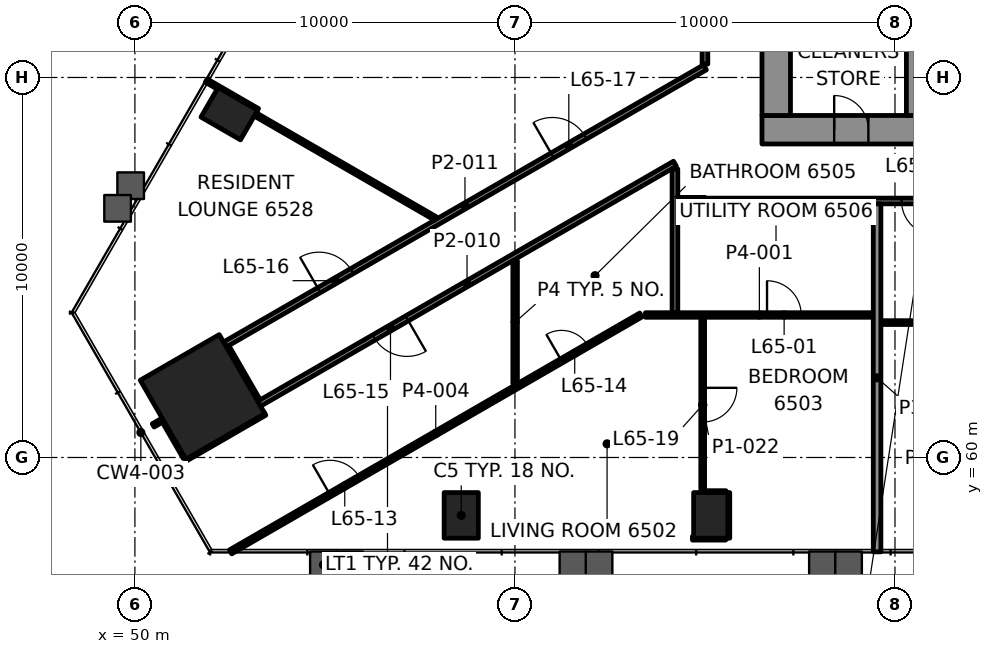
"""IFC4 building model, lengths in metres.
Left out: names, types, materials, properties, quantities, classifications, styles, units other than length and angle.
Written with IfcOpenShell. Run it as: python <this file> out.ifc"""

import sys

from ifc_helpers import new_model, si_unit, direction, frame, frame_2d, origin, origin_2d, place, context, subcontext, project, spatial, rectangle, hollow_rectangle, extrude, element, fill, save


model = new_model("IFC4")
c1 = context("Model", 3, precision=1e-05, world=origin(), true_north=direction((0.0, 1.0)))
c2 = subcontext(c1, "Body", "Model", "MODEL_VIEW")
j1 = project(units=[si_unit("LENGTHUNIT", "METRE"), si_unit("PLANEANGLEUNIT", "RADIAN")], contexts=[c1])
p1 = place(None, origin())
s1 = spatial("IfcSite", under=j1, at=p1, CompositionType="ELEMENT")
p2 = place(p1, origin())
s2 = spatial("IfcBuilding", under=s1, at=p2, CompositionType="ELEMENT")
p3 = place(p2, frame((0.0, 0.0, 274.1)))
s3 = spatial("IfcBuildingStorey", under=s2, at=p3, CompositionType="ELEMENT", Elevation=274.1)
p4 = place(p3, frame((51.78, 61.594, 0.0), z_axis=(0.0, 0.0, 1.0), x_axis=(0.5, -0.866025403784, 0.0)))
e1 = element("IfcColumn", 1, at=p4, inside=s3, PredefinedType="COLUMN", context=c2, shape_type="SweptSolid", body=[
    extrude(rectangle(XDim=2.4, YDim=2.4, at=origin_2d()), origin(), (0.0, 0.0, 1.0), 3.5),
])
for number, where, z_axis, x_axis in (
    (2, (58.587, 58.476, -0.0), (0.0, 0.0, 1.0), (1.0, 0.0, 0.0)),
    (3, (65.152, 58.476, -0.0), (0.0, 0.0, 1.0), (1.0, 0.0, 0.0)),
    (4, (52.483, 69.047, -0.0), (0.0, 0.0, 1.0), (-0.5, -0.866, 0.0)),
):
    element("IfcColumn", number, at=place(p3, frame(where, z_axis=z_axis, x_axis=x_axis)), inside=s3, PredefinedType="COLUMN", context=c2, shape_type="SweptSolid", body=[
        extrude(hollow_rectangle(XDim=0.9, YDim=1.2, WallThickness=0.06, at=origin_2d()), origin(), (0.0, 0.0, 1.0), 3.5),
    ])
p5 = place(p3, frame((66.5, 68.625, 0.0), z_axis=(0.0, 0.0, 1.0), x_axis=(1.0, 0.0, 0.0)))
e5 = element("IfcWall", 5, at=p5, inside=s3, PredefinedType="SHEAR", context=c2, shape_type="SweptSolid", body=[
    extrude(rectangle(XDim=17.0, YDim=0.75, at=frame_2d((8.5, 0.0))), origin(), (0.0, 0.0, 1.0), 3.3),
])
p6 = place(p5, frame((1.9, 0.0, 0.0)))
e6 = element("IfcOpeningElement", 6, at=p6, cuts=e5, PredefinedType="OPENING", context=c2, shape_type="SweptSolid", body=[
    extrude(rectangle(XDim=0.9, YDim=2.1, at=frame_2d((0.45, 1.05))), frame((0.0, 0.385, 0.0), z_axis=(0.0, -1.0, 0.0), x_axis=(1.0, 0.0, 0.0)), (0.0, 0.0, 1.0), 0.77),
])
p7 = place(p3, frame((66.875, 69.0, 0.0), z_axis=(0.0, 0.0, 1.0), x_axis=(0.0, 1.0, 0.0)))
e7 = element("IfcWall", 7, at=p7, inside=s3, PredefinedType="SHEAR", context=c2, shape_type="SweptSolid", body=[
    extrude(rectangle(XDim=12.0, YDim=0.75, at=frame_2d((6.0, 0.0))), origin(), (0.0, 0.0, 1.0), 3.3),
])
p8 = place(p7, frame((3.7, 0.0, 0.0)))
e8 = element("IfcOpeningElement", 8, at=p8, cuts=e7, PredefinedType="OPENING", context=c2, shape_type="SweptSolid", body=[
    extrude(rectangle(XDim=1.2, YDim=2.1, at=frame_2d((0.6, 1.05))), frame((0.0, 0.385, 0.0), z_axis=(0.0, -1.0, 0.0), x_axis=(1.0, 0.0, 0.0)), (0.0, 0.0, 1.0), 0.77),
])
p9 = place(p3, frame((70.45, 69.0, 0.0), z_axis=(0.0, 0.0, 1.0), x_axis=(0.0, 1.0, 0.0)))
e9 = element("IfcWall", 9, at=p9, inside=s3, PredefinedType="SHEAR", context=c2, shape_type="SweptSolid", body=[
    extrude(rectangle(XDim=2.6, YDim=0.3, at=frame_2d((1.3, 0.0))), origin(), (0.0, 0.0, 1.0), 3.3),
])
p10 = place(p3, frame((64.67, 57.876, 0.0), z_axis=(0.0, 0.0, 1.0), x_axis=(1.0, 0.0, 0.0)))
e10 = element("IfcWall", 10, at=p10, inside=s3, PredefinedType="PARTITIONING", context=c2, shape_type="SweptSolid", body=[
    extrude(rectangle(XDim=0.875, YDim=0.1, at=frame_2d((0.438, 0.0))), origin(), (0.0, 0.0, 1.0), 2.7),
])
p11 = place(p3, frame((64.99, 59.076, 0.0), z_axis=(0.0, 0.0, 1.0), x_axis=(1.0, 0.0, 0.0)))
e11 = element("IfcWall", 11, at=p11, inside=s3, PredefinedType="PARTITIONING", context=c2, shape_type="SweptSolid", body=[
    extrude(rectangle(XDim=0.562, YDim=0.1, at=frame_2d((0.281, 0.0))), origin(), (0.0, 0.0, 1.0), 2.7),
])
p12 = place(p3, frame((69.629, 63.55, 0.0), z_axis=(0.0, 0.0, 1.0), x_axis=(1.0, 0.0, 0.0)))
e12 = element("IfcWall", 12, at=p12, inside=s3, PredefinedType="PARTITIONING", context=c2, shape_type="SweptSolid", body=[
    extrude(rectangle(XDim=8.653, YDim=0.1, at=frame_2d((4.326, 0.0))), origin(), (0.0, 0.0, 1.0), 2.7),
])
p13 = place(p3, frame((63.434, 63.75, 0.0), z_axis=(0.0, 0.0, 1.0), x_axis=(1.0, 0.0, 0.0)))
e13 = element("IfcWall", 13, at=p13, inside=s3, PredefinedType="PARTITIONING", context=c2, shape_type="SweptSolid", body=[
    extrude(rectangle(XDim=5.995, YDim=0.12, at=frame_2d((2.997, 0.0))), origin(), (0.0, 0.0, 1.0), 2.7),
])
p14 = place(p13, frame((3.199, 0.0, 0.0)))
e14 = element("IfcOpeningElement", 14, at=p14, cuts=e13, PredefinedType="OPENING", context=c2, shape_type="SweptSolid", body=[
    extrude(rectangle(XDim=0.9, YDim=2.1, at=frame_2d((0.45, 1.05))), frame((0.0, 0.07, 0.0), z_axis=(0.0, -1.0, 0.0), x_axis=(1.0, 0.0, 0.0)), (0.0, 0.0, 1.0), 0.14),
])
p15 = place(p3, frame((85.0, 66.75, 0.0), z_axis=(0.0, 0.0, 1.0), x_axis=(-1.0, 0.0, 0.0)))
e15 = element("IfcWall", 15, at=p15, inside=s3, PredefinedType="PARTITIONING", context=c2, shape_type="SweptSolid", body=[
    extrude(rectangle(XDim=19.999, YDim=0.15, at=frame_2d((10.0, 0.0))), origin(), (0.0, 0.0, 1.0), 2.7),
])
p16 = place(p15, frame((2.96, 0.0, 0.0)))
e16 = element("IfcOpeningElement", 16, at=p16, cuts=e15, PredefinedType="OPENING", context=c2, shape_type="SweptSolid", body=[
    extrude(rectangle(XDim=1.0, YDim=2.1, at=frame_2d((0.5, 1.05))), frame((0.0, 0.085, 0.0), z_axis=(0.0, -1.0, 0.0), x_axis=(1.0, 0.0, 0.0)), (0.0, 0.0, 1.0), 0.17),
])
p17 = place(p15, frame((7.361, 0.0, 0.0)))
e17 = element("IfcOpeningElement", 17, at=p17, cuts=e15, PredefinedType="OPENING", context=c2, shape_type="SweptSolid", body=[
    extrude(rectangle(XDim=0.9, YDim=2.1, at=frame_2d((0.45, 1.05))), frame((0.0, 0.085, 0.0), z_axis=(0.0, -1.0, 0.0), x_axis=(1.0, 0.0, 0.0)), (0.0, 0.0, 1.0), 0.17),
])
p18 = place(p15, frame((9.55, 0.0, 0.0)))
e18 = element("IfcOpeningElement", 18, at=p18, cuts=e15, PredefinedType="OPENING", context=c2, shape_type="SweptSolid", body=[
    extrude(rectangle(XDim=0.9, YDim=2.1, at=frame_2d((0.45, 1.05))), frame((0.0, 0.085, 0.0), z_axis=(0.0, -1.0, 0.0), x_axis=(1.0, 0.0, 0.0)), (0.0, 0.0, 1.0), 0.17),
])
p19 = place(p15, frame((11.738, 0.0, 0.0)))
e19 = element("IfcOpeningElement", 19, at=p19, cuts=e15, PredefinedType="OPENING", context=c2, shape_type="SweptSolid", body=[
    extrude(rectangle(XDim=0.9, YDim=2.1, at=frame_2d((0.45, 1.05))), frame((0.0, 0.085, 0.0), z_axis=(0.0, -1.0, 0.0), x_axis=(1.0, 0.0, 0.0)), (0.0, 0.0, 1.0), 0.17),
])
p20 = place(p15, frame((13.926, 0.0, 0.0)))
e20 = element("IfcOpeningElement", 20, at=p20, cuts=e15, PredefinedType="OPENING", context=c2, shape_type="SweptSolid", body=[
    extrude(rectangle(XDim=0.9, YDim=2.1, at=frame_2d((0.45, 1.05))), frame((0.0, 0.085, 0.0), z_axis=(0.0, -1.0, 0.0), x_axis=(1.0, 0.0, 0.0)), (0.0, 0.0, 1.0), 0.17),
])
p21 = place(p3, frame((64.295, 66.769, 0.0), z_axis=(0.0, 0.0, 1.0), x_axis=(1.0, 0.0, 0.0)))
e21 = element("IfcWall", 21, at=p21, inside=s3, PredefinedType="PARTITIONING", context=c2, shape_type="SweptSolid", body=[
    extrude(rectangle(XDim=0.705, YDim=0.15, at=frame_2d((0.353, 0.0))), origin(), (0.0, 0.0, 1.0), 2.7),
])
p22 = place(p3, frame((52.517, 57.516, 0.0), z_axis=(0.0, 0.0, 1.0), x_axis=(0.866028080334, 0.499995364051, 0.0)))
e22 = element("IfcWall", 22, at=p22, inside=s3, PredefinedType="PARTITIONING", context=c2, shape_type="SweptSolid", body=[
    extrude(rectangle(XDim=12.467, YDim=0.12, at=frame_2d((6.234, 0.0))), origin(), (0.0, 0.0, 1.0), 2.7),
])
p23 = place(p22, frame((3.019, 0.0, 0.0)))
e23 = element("IfcOpeningElement", 23, at=p23, cuts=e22, PredefinedType="OPENING", context=c2, shape_type="SweptSolid", body=[
    extrude(rectangle(XDim=0.9, YDim=2.1, at=frame_2d((0.45, 1.05))), frame((0.0, 0.07, 0.0), z_axis=(0.0, -1.0, 0.0), x_axis=(1.0, 0.0, 0.0)), (0.0, 0.0, 1.0), 0.14),
])
p24 = place(p22, frame((10.057, 0.0, 0.0)))
e24 = element("IfcOpeningElement", 24, at=p24, cuts=e22, PredefinedType="OPENING", context=c2, shape_type="SweptSolid", body=[
    extrude(rectangle(XDim=0.8, YDim=2.1, at=frame_2d((0.4, 1.05))), frame((0.0, 0.07, 0.0), z_axis=(0.0, -1.0, 0.0), x_axis=(1.0, 0.0, 0.0)), (0.0, 0.0, 1.0), 0.14),
])
p25 = place(p3, frame((51.341, 59.955, 0.0), z_axis=(0.0, 0.0, 1.0), x_axis=(0.866036455013, 0.499980858223, 0.0)))
e25 = element("IfcWall", 25, at=p25, inside=s3, PredefinedType="PARTITIONING", context=c2, shape_type="SweptSolid", body=[
    extrude(rectangle(XDim=2.399, YDim=0.1, at=frame_2d((1.199, 0.0))), origin(), (0.0, 0.0, 1.0), 2.7),
])
p26 = place(p3, frame((64.21, 67.731, 0.0), z_axis=(0.0, 0.0, 1.0), x_axis=(-0.866027247007, -0.499996807431, 0.0)))
e26 = element("IfcWall", 26, at=p26, inside=s3, PredefinedType="PARTITIONING", context=c2, shape_type="SweptSolid", body=[
    extrude(rectangle(XDim=12.633, YDim=0.15, at=frame_2d((6.316, 0.0))), origin(), (0.0, 0.0, 1.0), 2.547),
])
p27 = place(p26, frame((8.143, 0.0, 0.0)))
e27 = element("IfcOpeningElement", 27, at=p27, cuts=e26, PredefinedType="OPENING", context=c2, shape_type="SweptSolid", body=[
    extrude(rectangle(XDim=1.0, YDim=2.1, at=frame_2d((0.5, 1.05))), frame((0.0, 0.085, 0.0), z_axis=(0.0, -1.0, 0.0), x_axis=(1.0, 0.0, 0.0)), (0.0, 0.0, 1.0), 0.17),
])
p28 = place(p3, frame((50.481, 60.844, 0.0), z_axis=(0.0, 0.0, 1.0), x_axis=(0.866429964967, 0.499298623879, 0.0)))
e28 = element("IfcWall", 28, at=p28, inside=s3, PredefinedType="PARTITIONING", context=c2, shape_type="SweptSolid", body=[
    extrude(rectangle(XDim=0.249, YDim=0.1, at=frame_2d((0.125, 0.0))), origin(), (0.0, 0.0, 1.0), 2.7),
])
p29 = place(p3, frame((52.37, 62.974, 0.0), z_axis=(0.0, 0.0, 1.0), x_axis=(0.866025849409, 0.499999228155, 0.0)))
e29 = element("IfcWall", 29, at=p29, inside=s3, PredefinedType="PARTITIONING", context=c2, shape_type="SweptSolid", body=[
    extrude(rectangle(XDim=14.584, YDim=0.15, at=frame_2d((7.292, 0.0))), origin(), (0.0, 0.0, 1.0), 2.7),
])
p30 = place(p29, frame((2.858, 0.0, 0.0)))
e30 = element("IfcOpeningElement", 30, at=p30, cuts=e29, PredefinedType="OPENING", context=c2, shape_type="SweptSolid", body=[
    extrude(rectangle(XDim=1.0, YDim=2.1, at=frame_2d((0.5, 1.05))), frame((0.0, 0.085, 0.0), z_axis=(0.0, -1.0, 0.0), x_axis=(1.0, 0.0, 0.0)), (0.0, 0.0, 1.0), 0.17),
])
p31 = place(p29, frame((9.947, 0.0, 0.0)))
e31 = element("IfcOpeningElement", 31, at=p31, cuts=e29, PredefinedType="OPENING", context=c2, shape_type="SweptSolid", body=[
    extrude(rectangle(XDim=1.0, YDim=2.1, at=frame_2d((0.5, 1.05))), frame((0.0, 0.085, 0.0), z_axis=(0.0, -1.0, 0.0), x_axis=(1.0, 0.0, 0.0)), (0.0, 0.0, 1.0), 0.17),
])
p32 = place(p3, frame((69.529, 57.516, 0.0), z_axis=(0.0, 0.0, 1.0), x_axis=(0.0, 1.0, 0.0)))
e32 = element("IfcWall", 32, at=p32, inside=s3, PredefinedType="PARTITIONING", context=c2, shape_type="SweptSolid", body=[
    extrude(rectangle(XDim=9.159, YDim=0.2, at=frame_2d((4.579, 0.0))), origin(), (0.0, 0.0, 1.0), 2.688),
])
p33 = place(p3, frame((65.602, 57.876, 0.0), z_axis=(0.0, 0.0, 1.0), x_axis=(0.0, 1.0, 0.0)))
e33 = element("IfcWall", 33, at=p33, inside=s3, PredefinedType="PARTITIONING", context=c2, shape_type="SweptSolid", body=[
    extrude(rectangle(XDim=1.2, YDim=0.1, at=frame_2d((0.6, 0.0))), origin(), (0.0, 0.0, 1.0), 2.688),
])
p34 = place(p3, frame((65.0, 70.352, 0.0), z_axis=(0.0, 0.0, 1.0), x_axis=(0.0, 1.0, 0.0)))
e34 = element("IfcWall", 34, at=p34, inside=s3, PredefinedType="PARTITIONING", context=c2, shape_type="SweptSolid", body=[
    extrude(rectangle(XDim=12.898, YDim=0.15, at=frame_2d((6.449, 0.0))), origin(), (0.0, 0.0, 1.0), 2.7),
])
p35 = place(p3, frame((64.94, 63.69, 0.0), z_axis=(0.0, 0.0, 1.0), x_axis=(0.0, -1.0, 0.0)))
e35 = element("IfcWall", 35, at=p35, inside=s3, PredefinedType="PARTITIONING", context=c2, shape_type="SweptSolid", body=[
    extrude(rectangle(XDim=4.614, YDim=0.1, at=frame_2d((2.307, 0.0))), origin(), (0.0, 0.0, 1.0), 2.7),
])
p36 = place(p35, frame((1.857, 0.0, 0.0)))
e36 = element("IfcOpeningElement", 36, at=p36, cuts=e35, PredefinedType="OPENING", context=c2, shape_type="SweptSolid", body=[
    extrude(rectangle(XDim=0.9, YDim=2.1, at=frame_2d((0.45, 1.05))), frame((0.0, 0.06, 0.0), z_axis=(0.0, -1.0, 0.0), x_axis=(1.0, 0.0, 0.0)), (0.0, 0.0, 1.0), 0.12),
])
p37 = place(p3, frame((64.21, 63.81, 0.0), z_axis=(0.0, 0.0, 1.0), x_axis=(0.0, 1.0, 0.0)))
e37 = element("IfcWall", 37, at=p37, inside=s3, PredefinedType="PARTITIONING", context=c2, shape_type="SweptSolid", body=[
    extrude(rectangle(XDim=3.784, YDim=0.15, at=frame_2d((1.892, 0.0))), origin(), (0.0, 0.0, 1.0), 2.547),
])
p38 = place(p3, frame((60.005, 61.948, 0.0), z_axis=(0.0, 0.0, 1.0), x_axis=(0.0, 1.0, 0.0)))
e38 = element("IfcWall", 38, at=p38, inside=s3, PredefinedType="PARTITIONING", context=c2, shape_type="SweptSolid", body=[
    extrude(rectangle(XDim=3.228, YDim=0.12, at=frame_2d((1.614, 0.0))), origin(), (0.0, 0.0, 1.0), 2.547),
])
p39 = place(p3, frame((53.229, 61.484, 0.0), z_axis=(0.0, 0.0, 1.0), x_axis=(-0.500052415518, 0.865995139556, 0.0)))
e39 = element("IfcWall", 39, at=p39, inside=s3, PredefinedType="PARTITIONING", context=c2, shape_type="SweptSolid", body=[
    extrude(rectangle(XDim=1.644, YDim=0.15, at=frame_2d((0.822, 0.0))), origin(), (0.0, 0.0, 1.0), 2.547),
])
p40 = place(p3, frame((51.316, 59.999, 0.0), z_axis=(0.0, 0.0, 1.0), x_axis=(-0.499955427682, 0.866051136095, 0.0)))
e40 = element("IfcWall", 40, at=p40, inside=s3, PredefinedType="PARTITIONING", context=c2, shape_type="SweptSolid", body=[
    extrude(rectangle(XDim=1.149, YDim=0.1, at=frame_2d((0.574, 0.0))), origin(), (0.0, 0.0, 1.0), 2.7),
])
p41 = place(p3, frame((53.228, 69.138, 0.0), z_axis=(0.0, 0.0, 1.0), x_axis=(-0.866018739521, 0.500011542666, 0.0)))
e41 = element("IfcWall", 41, at=p41, inside=s3, PredefinedType="PARTITIONING", context=c2, shape_type="SweptSolid", body=[
    extrude(rectangle(XDim=1.56, YDim=0.1, at=frame_2d((0.78, 0.0))), origin(), (0.0, 0.0, 1.0), 2.7),
])
p42 = place(p3, frame((57.91, 66.289, 0.0), z_axis=(0.0, 0.0, 1.0), x_axis=(-0.866026762963, 0.499997645826, 0.0)))
e42 = element("IfcWall", 42, at=p42, inside=s3, PredefinedType="PARTITIONING", context=c2, shape_type="SweptSolid", body=[
    extrude(rectangle(XDim=5.478, YDim=0.1, at=frame_2d((2.739, 0.0))), origin(), (0.0, 0.0, 1.0), 2.7),
])
p43 = place(p14, origin())
e43 = element("IfcDoor", 43, at=p43, inside=s3, OperationType="SINGLE_SWING_LEFT", PredefinedType="DOOR", context=c2, shape_type="SweptSolid", body=[
    extrude(rectangle(XDim=0.9, YDim=2.1, at=frame_2d((0.45, 1.05))), frame((0.0, 0.025, 0.0), z_axis=(0.0, -1.0, 0.0), x_axis=(1.0, 0.0, 0.0)), (0.0, 0.0, 1.0), 0.05),
])
fill(e14, e43)
p44 = place(p20, origin())
e44 = element("IfcDoor", 44, at=p44, inside=s3, OperationType="SINGLE_SWING_LEFT", PredefinedType="DOOR", context=c2, shape_type="SweptSolid", body=[
    extrude(rectangle(XDim=0.9, YDim=2.1, at=frame_2d((0.45, 1.05))), frame((0.0, 0.025, 0.0), z_axis=(0.0, -1.0, 0.0), x_axis=(1.0, 0.0, 0.0)), (0.0, 0.0, 1.0), 0.05),
])
fill(e20, e44)
p45 = place(p23, origin())
e45 = element("IfcDoor", 45, at=p45, inside=s3, OperationType="SINGLE_SWING_LEFT", PredefinedType="DOOR", context=c2, shape_type="SweptSolid", body=[
    extrude(rectangle(XDim=0.9, YDim=2.1, at=frame_2d((0.45, 1.05))), frame((0.0, 0.025, 0.0), z_axis=(0.0, -1.0, 0.0), x_axis=(1.0, 0.0, 0.0)), (0.0, 0.0, 1.0), 0.05),
])
fill(e23, e45)
p46 = place(p24, origin())
e46 = element("IfcDoor", 46, at=p46, inside=s3, OperationType="SINGLE_SWING_RIGHT", PredefinedType="DOOR", context=c2, shape_type="SweptSolid", body=[
    extrude(rectangle(XDim=0.8, YDim=2.1, at=frame_2d((0.4, 1.05))), frame((0.0, 0.025, 0.0), z_axis=(0.0, -1.0, 0.0), x_axis=(1.0, 0.0, 0.0)), (0.0, 0.0, 1.0), 0.05),
])
fill(e24, e46)
p47 = place(p27, origin())
e47 = element("IfcDoor", 47, at=p47, inside=s3, OperationType="SINGLE_SWING_LEFT", PredefinedType="DOOR", context=c2, shape_type="SweptSolid", body=[
    extrude(rectangle(XDim=1.0, YDim=2.1, at=frame_2d((0.5, 1.05))), frame((0.0, 0.025, 0.0), z_axis=(0.0, -1.0, 0.0), x_axis=(1.0, 0.0, 0.0)), (0.0, 0.0, 1.0), 0.05),
])
fill(e27, e47)
p48 = place(p30, origin())
e48 = element("IfcDoor", 48, at=p48, inside=s3, OperationType="SINGLE_SWING_LEFT", PredefinedType="DOOR", context=c2, shape_type="SweptSolid", body=[
    extrude(rectangle(XDim=1.0, YDim=2.1, at=frame_2d((0.5, 1.05))), frame((0.0, 0.025, 0.0), z_axis=(0.0, -1.0, 0.0), x_axis=(1.0, 0.0, 0.0)), (0.0, 0.0, 1.0), 0.05),
])
fill(e30, e48)
p49 = place(p31, origin())
e49 = element("IfcDoor", 49, at=p49, inside=s3, OperationType="SINGLE_SWING_RIGHT", PredefinedType="DOOR", context=c2, shape_type="SweptSolid", body=[
    extrude(rectangle(XDim=1.0, YDim=2.1, at=frame_2d((0.5, 1.05))), frame((0.0, 0.025, 0.0), z_axis=(0.0, -1.0, 0.0), x_axis=(1.0, 0.0, 0.0)), (0.0, 0.0, 1.0), 0.05),
])
fill(e31, e49)
p50 = place(p36, origin())
e50 = element("IfcDoor", 50, at=p50, inside=s3, OperationType="SINGLE_SWING_RIGHT", PredefinedType="DOOR", context=c2, shape_type="SweptSolid", body=[
    extrude(rectangle(XDim=0.9, YDim=2.1, at=frame_2d((0.45, 1.05))), frame((0.0, 0.025, 0.0), z_axis=(0.0, -1.0, 0.0), x_axis=(1.0, 0.0, 0.0)), (0.0, 0.0, 1.0), 0.05),
])
fill(e36, e50)
p51 = place(p6, origin())
e51 = element("IfcDoor", 51, at=p51, inside=s3, OperationType="SINGLE_SWING_RIGHT", PredefinedType="DOOR", context=c2, shape_type="SweptSolid", body=[
    extrude(rectangle(XDim=0.9, YDim=2.1, at=frame_2d((0.45, 1.05))), frame((0.0, 0.095, 0.0), z_axis=(0.0, -1.0, 0.0), x_axis=(1.0, 0.0, 0.0)), (0.0, 0.0, 1.0), 0.19),
])
fill(e6, e51)
save(model, sys.argv[1])
